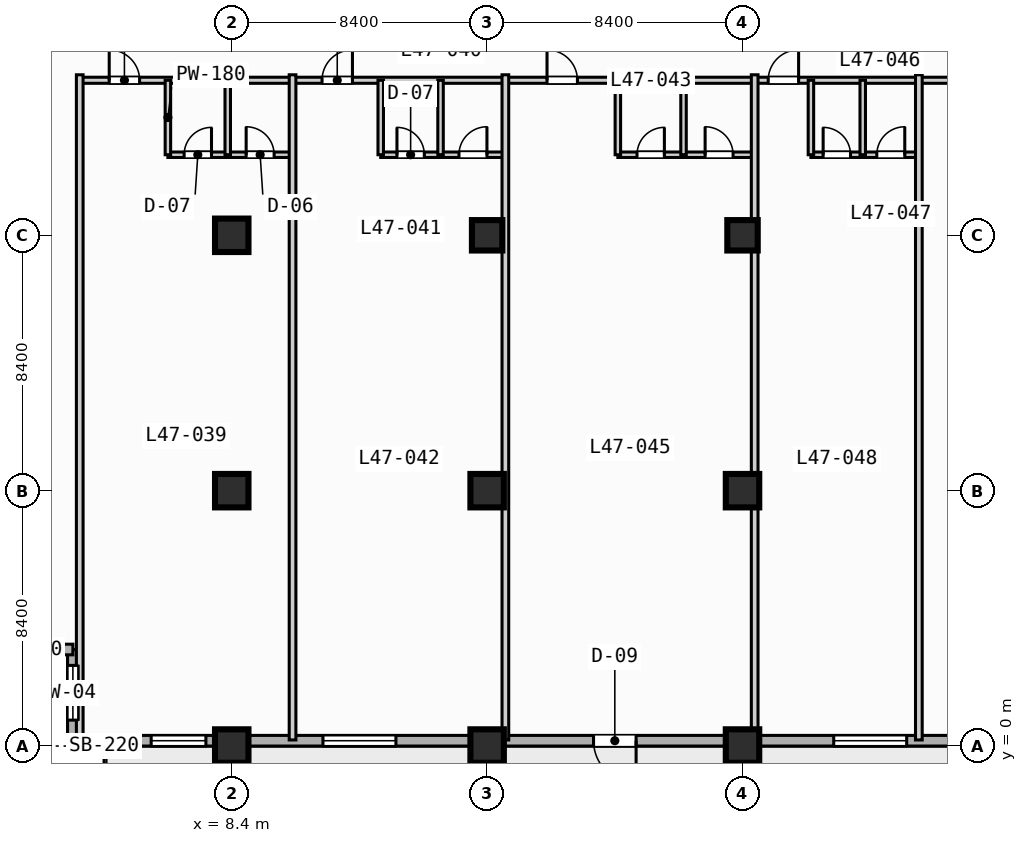
"""IFC4 building model, lengths in metres.
Left out: names, types, materials, properties, quantities, classifications, styles, units other than length and angle.
Written with IfcOpenShell. Run it as: python <this file> out.ifc"""

import sys

from ifc_helpers import new_model, si_unit, direction, frame, frame_2d, origin, origin_2d, place, context, subcontext, project, spatial, rectangle, extrude, element, fill, save


model = new_model("IFC4")
c1 = context("Model", 3, precision=1e-05, world=origin(), true_north=direction((0.0, 1.0)))
c2 = subcontext(c1, "Body", "Model", "MODEL_VIEW")
j1 = project(units=[si_unit("LENGTHUNIT", "METRE"), si_unit("PLANEANGLEUNIT", "RADIAN")], contexts=[c1])
p1 = place(None, origin())
s1 = spatial("IfcSite", under=j1, at=p1, CompositionType="ELEMENT")
p2 = place(p1, origin())
s2 = spatial("IfcBuilding", under=s1, at=p2, CompositionType="ELEMENT")
p3 = place(p2, frame((0.0, 0.0, 193.9)))
s3 = spatial("IfcBuildingStorey", under=s2, at=p3, CompositionType="ELEMENT", Elevation=193.9)
for number, where, z_axis, x_axis in (
    (1, (8.4, 0.0, 0.0), (0.0, 0.0, 1.0), (1.0, 0.0, 0.0)),
    (2, (8.4, 8.4, 0.0), (0.0, 0.0, 1.0), (1.0, 0.0, 0.0)),
    (3, (8.4, 16.8, 0.0), (0.0, 0.0, 1.0), (1.0, 0.0, 0.0)),
    (4, (16.8, 0.0, 0.0), (0.0, 0.0, 1.0), (1.0, 0.0, 0.0)),
    (5, (16.8, 8.4, 0.0), (0.0, 0.0, 1.0), (1.0, 0.0, 0.0)),
):
    element("IfcColumn", number, at=place(p3, frame(where, z_axis=z_axis, x_axis=x_axis)), inside=s3, PredefinedType="COLUMN", context=c2, shape_type="SweptSolid", body=[
        extrude(rectangle(XDim=1.1, YDim=1.1, at=origin_2d()), origin(), (0.0, 0.0, 1.0), 3.7),
    ])
p4 = place(p3, frame((16.8, 16.8, 0.0), z_axis=(0.0, 0.0, 1.0), x_axis=(1.0, 0.0, 0.0)))
e6 = element("IfcColumn", 6, at=p4, inside=s3, PredefinedType="COLUMN", context=c2, shape_type="SweptSolid", body=[
    extrude(rectangle(XDim=1.0, YDim=1.0, at=origin_2d()), origin(), (0.0, 0.0, 1.0), 3.7),
])
for number, where, z_axis, x_axis in (
    (7, (25.2, 0.0, 0.0), (0.0, 0.0, 1.0), (1.0, 0.0, 0.0)),
    (8, (25.2, 8.4, 0.0), (0.0, 0.0, 1.0), (1.0, 0.0, 0.0)),
):
    element("IfcColumn", number, at=place(p3, frame(where, z_axis=z_axis, x_axis=x_axis)), inside=s3, PredefinedType="COLUMN", context=c2, shape_type="SweptSolid", body=[
        extrude(rectangle(XDim=1.1, YDim=1.1, at=origin_2d()), origin(), (0.0, 0.0, 1.0), 3.7),
    ])
p5 = place(p3, frame((25.2, 16.8, 0.0), z_axis=(0.0, 0.0, 1.0), x_axis=(1.0, 0.0, 0.0)))
e9 = element("IfcColumn", 9, at=p5, inside=s3, PredefinedType="COLUMN", context=c2, shape_type="SweptSolid", body=[
    extrude(rectangle(XDim=1.0, YDim=1.0, at=origin_2d()), origin(), (0.0, 0.0, 1.0), 3.7),
])
p6 = place(p3, frame((3.175, 0.175, 0.0), z_axis=(0.0, 0.0, 1.0), x_axis=(0.0, 1.0, 0.0)))
e10 = element("IfcWall", 10, at=p6, inside=s3, PredefinedType="STANDARD", context=c2, shape_type="SweptSolid", body=[
    extrude(rectangle(XDim=3.0, YDim=0.35, at=frame_2d((1.5, 0.0))), origin(), (0.0, 0.0, 1.0), 3.47),
])
p7 = place(p6, frame((0.677, 0.0, 0.85)))
e11 = element("IfcOpeningElement", 11, at=p7, cuts=e10, PredefinedType="OPENING", context=c2, shape_type="SweptSolid", body=[
    extrude(rectangle(XDim=1.8, YDim=1.8, at=frame_2d((0.9, 0.9))), frame((0.0, 0.185, 0.0), z_axis=(0.0, -1.0, 0.0), x_axis=(1.0, 0.0, 0.0)), (0.0, 0.0, 1.0), 0.37),
])
p8 = place(p3, frame((3.175, 3.175, 0.0), z_axis=(0.0, 0.0, 1.0), x_axis=(-1.0, 0.0, 0.0)))
e12 = element("IfcWall", 12, at=p8, inside=s3, PredefinedType="STANDARD", context=c2, shape_type="SweptSolid", body=[
    extrude(rectangle(XDim=3.0, YDim=0.35, at=frame_2d((1.5, 0.0))), origin(), (0.0, 0.0, 1.0), 3.47),
])
p9 = place(p3, frame((72.425, 0.175, 0.0), z_axis=(0.0, 0.0, 1.0), x_axis=(-1.0, 0.0, 0.0)))
e13 = element("IfcWall", 13, at=p9, inside=s3, PredefinedType="STANDARD", context=c2, shape_type="SweptSolid", body=[
    extrude(rectangle(XDim=69.25, YDim=0.35, at=frame_2d((34.625, 0.0))), origin(), (0.0, 0.0, 1.0), 3.47),
])
p10 = place(p9, frame((50.725, 0.0, 0.0)))
e14 = element("IfcOpeningElement", 14, at=p10, cuts=e13, PredefinedType="OPENING", context=c2, shape_type="SweptSolid", body=[
    extrude(rectangle(XDim=1.4, YDim=2.2, at=frame_2d((0.7, 1.1))), frame((0.0, 0.185, 0.0), z_axis=(0.0, -1.0, 0.0), x_axis=(1.0, 0.0, 0.0)), (0.0, 0.0, 1.0), 0.37),
])
p11 = place(p9, frame((58.625, 0.0, 0.85)))
e15 = element("IfcOpeningElement", 15, at=p11, cuts=e13, PredefinedType="OPENING", context=c2, shape_type="SweptSolid", body=[
    extrude(rectangle(XDim=2.4, YDim=1.95, at=frame_2d((1.2, 0.975))), frame((0.0, 0.185, 0.0), z_axis=(0.0, -1.0, 0.0), x_axis=(1.0, 0.0, 0.0)), (0.0, 0.0, 1.0), 0.37),
])
p12 = place(p9, frame((41.825, 0.0, 0.85)))
e16 = element("IfcOpeningElement", 16, at=p12, cuts=e13, PredefinedType="OPENING", context=c2, shape_type="SweptSolid", body=[
    extrude(rectangle(XDim=2.4, YDim=1.95, at=frame_2d((1.2, 0.975))), frame((0.0, 0.185, 0.0), z_axis=(0.0, -1.0, 0.0), x_axis=(1.0, 0.0, 0.0)), (0.0, 0.0, 1.0), 0.37),
])
p13 = place(p9, frame((33.725, 0.0, 0.85)))
e17 = element("IfcOpeningElement", 17, at=p13, cuts=e13, PredefinedType="OPENING", context=c2, shape_type="SweptSolid", body=[
    extrude(rectangle(XDim=1.8, YDim=1.8, at=frame_2d((0.9, 0.9))), frame((0.0, 0.185, 0.0), z_axis=(0.0, -1.0, 0.0), x_axis=(1.0, 0.0, 0.0)), (0.0, 0.0, 1.0), 0.37),
])
p14 = place(p9, frame((25.025, 0.0, 0.85)))
e18 = element("IfcOpeningElement", 18, at=p14, cuts=e13, PredefinedType="OPENING", context=c2, shape_type="SweptSolid", body=[
    extrude(rectangle(XDim=2.4, YDim=1.95, at=frame_2d((1.2, 0.975))), frame((0.0, 0.185, 0.0), z_axis=(0.0, -1.0, 0.0), x_axis=(1.0, 0.0, 0.0)), (0.0, 0.0, 1.0), 0.37),
])
p15 = place(p9, frame((64.875, 0.0, 0.85)))
e19 = element("IfcOpeningElement", 19, at=p15, cuts=e13, PredefinedType="OPENING", context=c2, shape_type="SweptSolid", body=[
    extrude(rectangle(XDim=1.8, YDim=1.8, at=frame_2d((0.9, 0.9))), frame((0.0, 0.185, 0.0), z_axis=(0.0, -1.0, 0.0), x_axis=(1.0, 0.0, 0.0)), (0.0, 0.0, 1.0), 0.37),
])
p16 = place(p3, frame((3.4, 21.9, 0.0), z_axis=(0.0, 0.0, 1.0), x_axis=(1.0, 0.0, 0.0)))
e20 = element("IfcWall", 20, at=p16, inside=s3, PredefinedType="PARTITIONING", context=c2, shape_type="SweptSolid", body=[
    extrude(rectangle(XDim=35.8, YDim=0.2, at=frame_2d((17.9, 0.0))), origin(), (0.0, 0.0, 1.0), 3.47),
])
p17 = place(p16, frame((0.97, 0.0, 0.0)))
e21 = element("IfcOpeningElement", 21, at=p17, cuts=e20, PredefinedType="OPENING", context=c2, shape_type="SweptSolid", body=[
    extrude(rectangle(XDim=1.0, YDim=2.15, at=frame_2d((0.5, 1.075))), frame((0.0, 0.11, 0.0), z_axis=(0.0, -1.0, 0.0), x_axis=(1.0, 0.0, 0.0)), (0.0, 0.0, 1.0), 0.22),
])
p18 = place(p16, frame((7.97, 0.0, 0.0)))
e22 = element("IfcOpeningElement", 22, at=p18, cuts=e20, PredefinedType="OPENING", context=c2, shape_type="SweptSolid", body=[
    extrude(rectangle(XDim=1.0, YDim=2.15, at=frame_2d((0.5, 1.075))), frame((0.0, 0.11, 0.0), z_axis=(0.0, -1.0, 0.0), x_axis=(1.0, 0.0, 0.0)), (0.0, 0.0, 1.0), 0.22),
])
p19 = place(p16, frame((15.37, 0.0, 0.0)))
e23 = element("IfcOpeningElement", 23, at=p19, cuts=e20, PredefinedType="OPENING", context=c2, shape_type="SweptSolid", body=[
    extrude(rectangle(XDim=1.0, YDim=2.15, at=frame_2d((0.5, 1.075))), frame((0.0, 0.11, 0.0), z_axis=(0.0, -1.0, 0.0), x_axis=(1.0, 0.0, 0.0)), (0.0, 0.0, 1.0), 0.22),
])
p20 = place(p16, frame((22.645, 0.0, 0.0)))
e24 = element("IfcOpeningElement", 24, at=p20, cuts=e20, PredefinedType="OPENING", context=c2, shape_type="SweptSolid", body=[
    extrude(rectangle(XDim=1.0, YDim=2.15, at=frame_2d((0.5, 1.075))), frame((0.0, 0.11, 0.0), z_axis=(0.0, -1.0, 0.0), x_axis=(1.0, 0.0, 0.0)), (0.0, 0.0, 1.0), 0.22),
])
p21 = place(p16, frame((28.97, 0.0, 0.0)))
e25 = element("IfcOpeningElement", 25, at=p21, cuts=e20, PredefinedType="OPENING", context=c2, shape_type="SweptSolid", body=[
    extrude(rectangle(XDim=1.0, YDim=2.15, at=frame_2d((0.5, 1.075))), frame((0.0, 0.11, 0.0), z_axis=(0.0, -1.0, 0.0), x_axis=(1.0, 0.0, 0.0)), (0.0, 0.0, 1.0), 0.22),
])
p22 = place(p3, frame((3.4, 0.2, 0.0), z_axis=(0.0, 0.0, 1.0), x_axis=(0.0, 1.0, 0.0)))
e26 = element("IfcWall", 26, at=p22, inside=s3, PredefinedType="PARTITIONING", context=c2, shape_type="SweptSolid", body=[
    extrude(rectangle(XDim=21.88, YDim=0.22, at=frame_2d((10.94, 0.0))), origin(), (0.0, 0.0, 1.0), 3.47),
])
p23 = place(p3, frame((6.3, 19.45, 0.0), z_axis=(0.0, 0.0, 1.0), x_axis=(1.0, 0.0, 0.0)))
e27 = element("IfcWall", 27, at=p23, inside=s3, PredefinedType="PLUMBINGWALL", context=c2, shape_type="SweptSolid", body=[
    extrude(rectangle(XDim=4.1, YDim=0.18, at=frame_2d((2.05, 0.0))), origin(), (0.0, 0.0, 1.0), 3.47),
])
p24 = place(p23, frame((0.534, 0.0, 0.0)))
e28 = element("IfcOpeningElement", 28, at=p24, cuts=e27, PredefinedType="OPENING", context=c2, shape_type="SweptSolid", body=[
    extrude(rectangle(XDim=0.9, YDim=2.1, at=frame_2d((0.45, 1.05))), frame((0.0, 0.1, 0.0), z_axis=(0.0, -1.0, 0.0), x_axis=(1.0, 0.0, 0.0)), (0.0, 0.0, 1.0), 0.2),
])
p25 = place(p23, frame((2.574, 0.0, 0.0)))
e29 = element("IfcOpeningElement", 29, at=p25, cuts=e27, PredefinedType="OPENING", context=c2, shape_type="SweptSolid", body=[
    extrude(rectangle(XDim=0.92, YDim=2.1, at=frame_2d((0.46, 1.05))), frame((0.0, 0.1, 0.0), z_axis=(0.0, -1.0, 0.0), x_axis=(1.0, 0.0, 0.0)), (0.0, 0.0, 1.0), 0.2),
])
p26 = place(p3, frame((6.3, 19.45, 0.0), z_axis=(0.0, 0.0, 1.0), x_axis=(0.0, 1.0, 0.0)))
e30 = element("IfcWall", 30, at=p26, inside=s3, PredefinedType="PLUMBINGWALL", context=c2, shape_type="SweptSolid", body=[
    extrude(rectangle(XDim=2.45, YDim=0.18, at=frame_2d((1.225, 0.0))), origin(), (0.0, 0.0, 1.0), 3.47),
])
p27 = place(p3, frame((8.268, 19.45, 0.0), z_axis=(0.0, 0.0, 1.0), x_axis=(0.0, 1.0, 0.0)))
e31 = element("IfcWall", 31, at=p27, inside=s3, PredefinedType="PLUMBINGWALL", context=c2, shape_type="SweptSolid", body=[
    extrude(rectangle(XDim=2.45, YDim=0.18, at=frame_2d((1.225, 0.0))), origin(), (0.0, 0.0, 1.0), 3.116),
])
p28 = place(p3, frame((10.4, 0.2, 0.0), z_axis=(0.0, 0.0, 1.0), x_axis=(0.0, 1.0, 0.0)))
e32 = element("IfcWall", 32, at=p28, inside=s3, PredefinedType="PARTITIONING", context=c2, shape_type="SweptSolid", body=[
    extrude(rectangle(XDim=21.88, YDim=0.22, at=frame_2d((10.94, 0.0))), origin(), (0.0, 0.0, 1.0), 3.47),
])
p29 = place(p3, frame((13.3, 19.45, 0.0), z_axis=(0.0, 0.0, 1.0), x_axis=(1.0, 0.0, 0.0)))
e33 = element("IfcWall", 33, at=p29, inside=s3, PredefinedType="PLUMBINGWALL", context=c2, shape_type="SweptSolid", body=[
    extrude(rectangle(XDim=4.1, YDim=0.18, at=frame_2d((2.05, 0.0))), origin(), (0.0, 0.0, 1.0), 3.47),
])
p30 = place(p29, frame((0.534, 0.0, 0.0)))
e34 = element("IfcOpeningElement", 34, at=p30, cuts=e33, PredefinedType="OPENING", context=c2, shape_type="SweptSolid", body=[
    extrude(rectangle(XDim=0.9, YDim=2.1, at=frame_2d((0.45, 1.05))), frame((0.0, 0.1, 0.0), z_axis=(0.0, -1.0, 0.0), x_axis=(1.0, 0.0, 0.0)), (0.0, 0.0, 1.0), 0.2),
])
p31 = place(p29, frame((2.574, 0.0, 0.0)))
e35 = element("IfcOpeningElement", 35, at=p31, cuts=e33, PredefinedType="OPENING", context=c2, shape_type="SweptSolid", body=[
    extrude(rectangle(XDim=0.92, YDim=2.1, at=frame_2d((0.46, 1.05))), frame((0.0, 0.1, 0.0), z_axis=(0.0, -1.0, 0.0), x_axis=(1.0, 0.0, 0.0)), (0.0, 0.0, 1.0), 0.2),
])
for number, where, z_axis, x_axis in (
    (36, (13.3, 19.45, 0.0), (0.0, 0.0, 1.0), (0.0, 1.0, 0.0)),
    (37, (15.268, 19.45, 0.0), (0.0, 0.0, 1.0), (0.0, 1.0, 0.0)),
):
    element("IfcWall", number, at=place(p3, frame(where, z_axis=z_axis, x_axis=x_axis)), inside=s3, PredefinedType="PLUMBINGWALL", context=c2, shape_type="SweptSolid", body=[
        extrude(rectangle(XDim=2.45, YDim=0.18, at=frame_2d((1.225, 0.0))), origin(), (0.0, 0.0, 1.0), 3.47),
    ])
p32 = place(p3, frame((17.4, 0.2, 0.0), z_axis=(0.0, 0.0, 1.0), x_axis=(0.0, 1.0, 0.0)))
e38 = element("IfcWall", 38, at=p32, inside=s3, PredefinedType="PARTITIONING", context=c2, shape_type="SweptSolid", body=[
    extrude(rectangle(XDim=21.88, YDim=0.22, at=frame_2d((10.94, 0.0))), origin(), (0.0, 0.0, 1.0), 3.47),
])
p33 = place(p3, frame((21.1, 19.45, 0.0), z_axis=(0.0, 0.0, 1.0), x_axis=(1.0, 0.0, 0.0)))
e39 = element("IfcWall", 39, at=p33, inside=s3, PredefinedType="PLUMBINGWALL", context=c2, shape_type="SweptSolid", body=[
    extrude(rectangle(XDim=4.5, YDim=0.18, at=frame_2d((2.25, 0.0))), origin(), (0.0, 0.0, 1.0), 3.47),
])
p34 = place(p33, frame((0.63, 0.0, 0.0)))
e40 = element("IfcOpeningElement", 40, at=p34, cuts=e39, PredefinedType="OPENING", context=c2, shape_type="SweptSolid", body=[
    extrude(rectangle(XDim=0.9, YDim=2.1, at=frame_2d((0.45, 1.05))), frame((0.0, 0.1, 0.0), z_axis=(0.0, -1.0, 0.0), x_axis=(1.0, 0.0, 0.0)), (0.0, 0.0, 1.0), 0.2),
])
p35 = place(p33, frame((2.87, 0.0, 0.0)))
e41 = element("IfcOpeningElement", 41, at=p35, cuts=e39, PredefinedType="OPENING", context=c2, shape_type="SweptSolid", body=[
    extrude(rectangle(XDim=0.92, YDim=2.1, at=frame_2d((0.46, 1.05))), frame((0.0, 0.1, 0.0), z_axis=(0.0, -1.0, 0.0), x_axis=(1.0, 0.0, 0.0)), (0.0, 0.0, 1.0), 0.2),
])
for number, where, z_axis, x_axis in (
    (42, (21.1, 19.45, 0.0), (0.0, 0.0, 1.0), (0.0, 1.0, 0.0)),
    (43, (23.26, 19.45, 0.0), (0.0, 0.0, 1.0), (0.0, 1.0, 0.0)),
):
    element("IfcWall", number, at=place(p3, frame(where, z_axis=z_axis, x_axis=x_axis)), inside=s3, PredefinedType="PLUMBINGWALL", context=c2, shape_type="SweptSolid", body=[
        extrude(rectangle(XDim=2.45, YDim=0.18, at=frame_2d((1.225, 0.0))), origin(), (0.0, 0.0, 1.0), 3.47),
    ])
p36 = place(p3, frame((25.6, 0.2, 0.0), z_axis=(0.0, 0.0, 1.0), x_axis=(0.0, 1.0, 0.0)))
e44 = element("IfcWall", 44, at=p36, inside=s3, PredefinedType="PARTITIONING", context=c2, shape_type="SweptSolid", body=[
    extrude(rectangle(XDim=21.88, YDim=0.22, at=frame_2d((10.94, 0.0))), origin(), (0.0, 0.0, 1.0), 3.47),
])
p37 = place(p3, frame((27.45, 19.45, 0.0), z_axis=(0.0, 0.0, 1.0), x_axis=(1.0, 0.0, 0.0)))
e45 = element("IfcWall", 45, at=p37, inside=s3, PredefinedType="PLUMBINGWALL", context=c2, shape_type="SweptSolid", body=[
    extrude(rectangle(XDim=3.55, YDim=0.18, at=frame_2d((1.775, 0.0))), origin(), (0.0, 0.0, 1.0), 3.47),
])
p38 = place(p37, frame((0.402, 0.0, 0.0)))
e46 = element("IfcOpeningElement", 46, at=p38, cuts=e45, PredefinedType="OPENING", context=c2, shape_type="SweptSolid", body=[
    extrude(rectangle(XDim=0.9, YDim=2.1, at=frame_2d((0.45, 1.05))), frame((0.0, 0.1, 0.0), z_axis=(0.0, -1.0, 0.0), x_axis=(1.0, 0.0, 0.0)), (0.0, 0.0, 1.0), 0.2),
])
p39 = place(p37, frame((2.167, 0.0, 0.0)))
e47 = element("IfcOpeningElement", 47, at=p39, cuts=e45, PredefinedType="OPENING", context=c2, shape_type="SweptSolid", body=[
    extrude(rectangle(XDim=0.92, YDim=2.1, at=frame_2d((0.46, 1.05))), frame((0.0, 0.1, 0.0), z_axis=(0.0, -1.0, 0.0), x_axis=(1.0, 0.0, 0.0)), (0.0, 0.0, 1.0), 0.2),
])
for number, where, z_axis, x_axis in (
    (48, (27.45, 19.45, 0.0), (0.0, 0.0, 1.0), (0.0, 1.0, 0.0)),
    (49, (29.154, 19.45, 0.0), (0.0, 0.0, 1.0), (0.0, 1.0, 0.0)),
):
    element("IfcWall", number, at=place(p3, frame(where, z_axis=z_axis, x_axis=x_axis)), inside=s3, PredefinedType="PLUMBINGWALL", context=c2, shape_type="SweptSolid", body=[
        extrude(rectangle(XDim=2.45, YDim=0.18, at=frame_2d((1.225, 0.0))), origin(), (0.0, 0.0, 1.0), 3.47),
    ])
p40 = place(p3, frame((31.0, 0.2, 0.0), z_axis=(0.0, 0.0, 1.0), x_axis=(0.0, 1.0, 0.0)))
e50 = element("IfcWall", 50, at=p40, inside=s3, PredefinedType="PARTITIONING", context=c2, shape_type="SweptSolid", body=[
    extrude(rectangle(XDim=21.88, YDim=0.22, at=frame_2d((10.94, 0.0))), origin(), (0.0, 0.0, 1.0), 3.47),
])
p41 = place(p7, origin())
e51 = element("IfcWindow", 51, at=p41, inside=s3, PartitioningType="SINGLE_PANEL", PredefinedType="WINDOW", context=c2, shape_type="SweptSolid", body=[
    extrude(rectangle(XDim=1.8, YDim=1.8, at=frame_2d((0.9, 0.9))), frame((0.0, 0.03, 0.0), z_axis=(0.0, -1.0, 0.0), x_axis=(1.0, 0.0, 0.0)), (0.0, 0.0, 1.0), 0.06),
])
fill(e11, e51)
p42 = place(p10, origin())
e52 = element("IfcDoor", 52, at=p42, inside=s3, OperationType="SINGLE_SWING_LEFT", PredefinedType="DOOR", context=c2, shape_type="SweptSolid", body=[
    extrude(rectangle(XDim=1.4, YDim=2.2, at=frame_2d((0.7, 1.1))), frame((0.0, 0.025, 0.0), z_axis=(0.0, -1.0, 0.0), x_axis=(1.0, 0.0, 0.0)), (0.0, 0.0, 1.0), 0.05),
])
fill(e14, e52)
p43 = place(p11, origin())
e53 = element("IfcWindow", 53, at=p43, inside=s3, PartitioningType="SINGLE_PANEL", PredefinedType="WINDOW", context=c2, shape_type="SweptSolid", body=[
    extrude(rectangle(XDim=2.4, YDim=1.95, at=frame_2d((1.2, 0.975))), frame((0.0, 0.03, 0.0), z_axis=(0.0, -1.0, 0.0), x_axis=(1.0, 0.0, 0.0)), (0.0, 0.0, 1.0), 0.06),
])
fill(e15, e53)
p44 = place(p12, origin())
e54 = element("IfcWindow", 54, at=p44, inside=s3, PartitioningType="SINGLE_PANEL", PredefinedType="WINDOW", context=c2, shape_type="SweptSolid", body=[
    extrude(rectangle(XDim=2.4, YDim=1.95, at=frame_2d((1.2, 0.975))), frame((0.0, 0.03, 0.0), z_axis=(0.0, -1.0, 0.0), x_axis=(1.0, 0.0, 0.0)), (0.0, 0.0, 1.0), 0.06),
])
fill(e16, e54)
p45 = place(p15, origin())
e55 = element("IfcWindow", 55, at=p45, inside=s3, PartitioningType="SINGLE_PANEL", PredefinedType="WINDOW", context=c2, shape_type="SweptSolid", body=[
    extrude(rectangle(XDim=1.8, YDim=1.8, at=frame_2d((0.9, 0.9))), frame((0.0, 0.03, 0.0), z_axis=(0.0, -1.0, 0.0), x_axis=(1.0, 0.0, 0.0)), (0.0, 0.0, 1.0), 0.06),
])
fill(e19, e55)
p46 = place(p17, origin())
e56 = element("IfcDoor", 56, at=p46, inside=s3, OperationType="SINGLE_SWING_LEFT", PredefinedType="DOOR", context=c2, shape_type="SweptSolid", body=[
    extrude(rectangle(XDim=1.0, YDim=2.15, at=frame_2d((0.5, 1.075))), frame((0.0, 0.025, 0.0), z_axis=(0.0, -1.0, 0.0), x_axis=(1.0, 0.0, 0.0)), (0.0, 0.0, 1.0), 0.05),
])
fill(e21, e56)
p47 = place(p18, origin())
e57 = element("IfcDoor", 57, at=p47, inside=s3, OperationType="SINGLE_SWING_RIGHT", PredefinedType="DOOR", context=c2, shape_type="SweptSolid", body=[
    extrude(rectangle(XDim=1.0, YDim=2.15, at=frame_2d((0.5, 1.075))), frame((0.0, 0.025, 0.0), z_axis=(0.0, -1.0, 0.0), x_axis=(1.0, 0.0, 0.0)), (0.0, 0.0, 1.0), 0.05),
])
fill(e22, e57)
p48 = place(p19, origin())
e58 = element("IfcDoor", 58, at=p48, inside=s3, OperationType="SINGLE_SWING_LEFT", PredefinedType="DOOR", context=c2, shape_type="SweptSolid", body=[
    extrude(rectangle(XDim=1.0, YDim=2.15, at=frame_2d((0.5, 1.075))), frame((0.0, 0.025, 0.0), z_axis=(0.0, -1.0, 0.0), x_axis=(1.0, 0.0, 0.0)), (0.0, 0.0, 1.0), 0.05),
])
fill(e23, e58)
p49 = place(p20, origin())
e59 = element("IfcDoor", 59, at=p49, inside=s3, OperationType="SINGLE_SWING_RIGHT", PredefinedType="DOOR", context=c2, shape_type="SweptSolid", body=[
    extrude(rectangle(XDim=1.0, YDim=2.15, at=frame_2d((0.5, 1.075))), frame((0.0, 0.025, 0.0), z_axis=(0.0, -1.0, 0.0), x_axis=(1.0, 0.0, 0.0)), (0.0, 0.0, 1.0), 0.05),
])
fill(e24, e59)
p50 = place(p24, origin())
e60 = element("IfcDoor", 60, at=p50, inside=s3, OperationType="SINGLE_SWING_RIGHT", PredefinedType="DOOR", context=c2, shape_type="SweptSolid", body=[
    extrude(rectangle(XDim=0.9, YDim=2.1, at=frame_2d((0.45, 1.05))), frame((0.0, 0.025, 0.0), z_axis=(0.0, -1.0, 0.0), x_axis=(1.0, 0.0, 0.0)), (0.0, 0.0, 1.0), 0.05),
])
fill(e28, e60)
p51 = place(p25, origin())
e61 = element("IfcDoor", 61, at=p51, inside=s3, OperationType="SINGLE_SWING_LEFT", PredefinedType="DOOR", context=c2, shape_type="SweptSolid", body=[
    extrude(rectangle(XDim=0.92, YDim=2.1, at=frame_2d((0.46, 1.05))), frame((0.0, 0.025, 0.0), z_axis=(0.0, -1.0, 0.0), x_axis=(1.0, 0.0, 0.0)), (0.0, 0.0, 1.0), 0.05),
])
fill(e29, e61)
p52 = place(p30, origin())
e62 = element("IfcDoor", 62, at=p52, inside=s3, OperationType="SINGLE_SWING_LEFT", PredefinedType="DOOR", context=c2, shape_type="SweptSolid", body=[
    extrude(rectangle(XDim=0.9, YDim=2.1, at=frame_2d((0.45, 1.05))), frame((0.0, 0.025, 0.0), z_axis=(0.0, -1.0, 0.0), x_axis=(1.0, 0.0, 0.0)), (0.0, 0.0, 1.0), 0.05),
])
fill(e34, e62)
p53 = place(p31, origin())
e63 = element("IfcDoor", 63, at=p53, inside=s3, OperationType="SINGLE_SWING_RIGHT", PredefinedType="DOOR", context=c2, shape_type="SweptSolid", body=[
    extrude(rectangle(XDim=0.92, YDim=2.1, at=frame_2d((0.46, 1.05))), frame((0.0, 0.025, 0.0), z_axis=(0.0, -1.0, 0.0), x_axis=(1.0, 0.0, 0.0)), (0.0, 0.0, 1.0), 0.05),
])
fill(e35, e63)
p54 = place(p34, origin())
e64 = element("IfcDoor", 64, at=p54, inside=s3, OperationType="SINGLE_SWING_RIGHT", PredefinedType="DOOR", context=c2, shape_type="SweptSolid", body=[
    extrude(rectangle(XDim=0.9, YDim=2.1, at=frame_2d((0.45, 1.05))), frame((0.0, 0.025, 0.0), z_axis=(0.0, -1.0, 0.0), x_axis=(1.0, 0.0, 0.0)), (0.0, 0.0, 1.0), 0.05),
])
fill(e40, e64)
p55 = place(p35, origin())
e65 = element("IfcDoor", 65, at=p55, inside=s3, OperationType="SINGLE_SWING_LEFT", PredefinedType="DOOR", context=c2, shape_type="SweptSolid", body=[
    extrude(rectangle(XDim=0.92, YDim=2.1, at=frame_2d((0.46, 1.05))), frame((0.0, 0.025, 0.0), z_axis=(0.0, -1.0, 0.0), x_axis=(1.0, 0.0, 0.0)), (0.0, 0.0, 1.0), 0.05),
])
fill(e41, e65)
p56 = place(p38, origin())
e66 = element("IfcDoor", 66, at=p56, inside=s3, OperationType="SINGLE_SWING_LEFT", PredefinedType="DOOR", context=c2, shape_type="SweptSolid", body=[
    extrude(rectangle(XDim=0.9, YDim=2.1, at=frame_2d((0.45, 1.05))), frame((0.0, 0.025, 0.0), z_axis=(0.0, -1.0, 0.0), x_axis=(1.0, 0.0, 0.0)), (0.0, 0.0, 1.0), 0.05),
])
fill(e46, e66)
p57 = place(p39, origin())
e67 = element("IfcDoor", 67, at=p57, inside=s3, OperationType="SINGLE_SWING_RIGHT", PredefinedType="DOOR", context=c2, shape_type="SweptSolid", body=[
    extrude(rectangle(XDim=0.92, YDim=2.1, at=frame_2d((0.46, 1.05))), frame((0.0, 0.025, 0.0), z_axis=(0.0, -1.0, 0.0), x_axis=(1.0, 0.0, 0.0)), (0.0, 0.0, 1.0), 0.05),
])
fill(e47, e67)
save(model, sys.argv[1])
